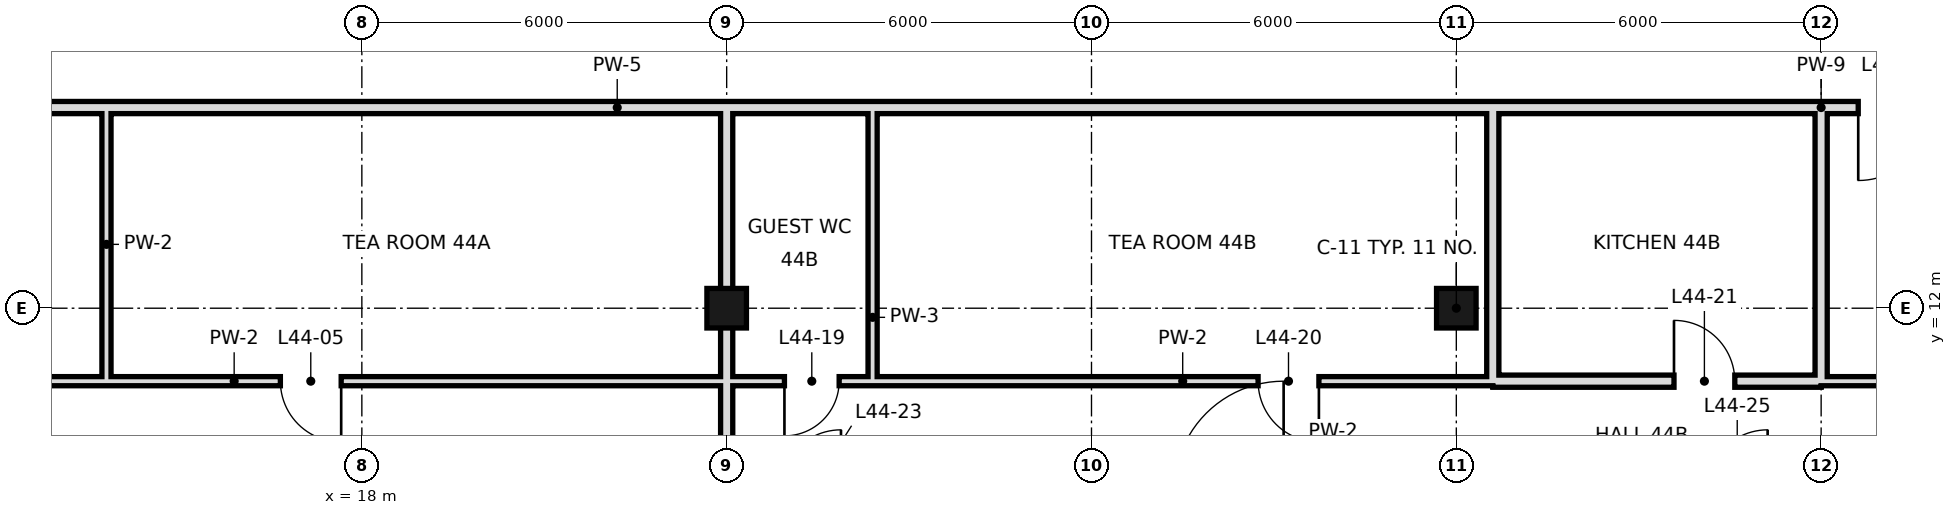
"""IFC4 building model, lengths in metres.
Left out: names, types, materials, properties, quantities, classifications, styles, units other than length and angle.
Written with IfcOpenShell. Run it as: python <this file> out.ifc"""

import sys

from ifc_helpers import new_model, si_unit, direction, frame, frame_2d, origin, origin_2d, place, context, subcontext, project, spatial, rectangle, hollow_rectangle, extrude, element, fill, save


model = new_model("IFC4")
c1 = context("Model", 3, precision=1e-05, world=origin(), true_north=direction((0.0, 1.0)))
c2 = subcontext(c1, "Body", "Model", "MODEL_VIEW")
j1 = project(units=[si_unit("LENGTHUNIT", "METRE"), si_unit("PLANEANGLEUNIT", "RADIAN")], contexts=[c1])
p1 = place(None, origin())
s1 = spatial("IfcSite", under=j1, at=p1, CompositionType="ELEMENT")
p2 = place(p1, origin())
s2 = spatial("IfcBuilding", under=s1, at=p2, CompositionType="ELEMENT")
p3 = place(p2, frame((0.0, 0.0, 192.0)))
s3 = spatial("IfcBuildingStorey", under=s2, at=p3, CompositionType="ELEMENT", Elevation=192.0)
for number, where, z_axis, x_axis in (
    (1, (24.0, 12.0, 0.0), (0.0, 0.0, 1.0), (1.0, 0.0, 0.0)),
    (2, (36.0, 12.0, 0.0), (0.0, 0.0, 1.0), (1.0, 0.0, 0.0)),
):
    element("IfcColumn", number, at=place(p3, frame(where, z_axis=z_axis, x_axis=x_axis)), inside=s3, PredefinedType="COLUMN", context=c2, shape_type="SweptSolid", body=[
        extrude(hollow_rectangle(XDim=0.65, YDim=0.65, WallThickness=0.032, at=origin_2d()), origin(), (0.0, 0.0, 1.0), 3.6),
    ])
p4 = place(p3, frame((13.8, 10.8, 0.0), z_axis=(0.0, 0.0, 1.0), x_axis=(0.0, 1.0, 0.0)))
e3 = element("IfcWall", 3, at=p4, inside=s3, PredefinedType="PARTITIONING", context=c2, shape_type="SweptSolid", body=[
    extrude(rectangle(XDim=4.5, YDim=0.15, at=frame_2d((2.25, 0.0))), origin(), (0.0, 0.0, 1.0), 3.42),
])
p5 = place(p3, frame((24.0, 0.0, 0.0), z_axis=(0.0, 0.0, 1.0), x_axis=(0.0, 1.0, 0.0)))
e4 = element("IfcWall", 4, at=p5, inside=s3, PredefinedType="SOLIDWALL", context=c2, shape_type="SweptSolid", body=[
    extrude(rectangle(XDim=15.3, YDim=0.2, at=frame_2d((7.65, 0.0))), origin(), (0.0, 0.0, 1.0), 2.72),
])
p6 = place(p3, frame((26.4, 10.8, 0.0), z_axis=(0.0, 0.0, 1.0), x_axis=(0.0, 1.0, 0.0)))
e5 = element("IfcWall", 5, at=p6, inside=s3, PredefinedType="PARTITIONING", context=c2, shape_type="SweptSolid", body=[
    extrude(rectangle(XDim=4.5, YDim=0.15, at=frame_2d((2.25, 0.0))), origin(), (0.0, 0.0, 1.0), 3.42),
])
for number, where, z_axis, x_axis in (
    (6, (36.6, 10.8, 0.0), (0.0, 0.0, 1.0), (0.0, 1.0, 0.0)),
    (7, (42.0, 10.8, 0.0), (0.0, 0.0, 1.0), (0.0, 1.0, 0.0)),
):
    element("IfcWall", number, at=place(p3, frame(where, z_axis=z_axis, x_axis=x_axis)), inside=s3, PredefinedType="SOLIDWALL", context=c2, shape_type="SweptSolid", body=[
        extrude(rectangle(XDim=4.5, YDim=0.2, at=frame_2d((2.25, 0.0))), origin(), (0.0, 0.0, 1.0), 2.72),
    ])
p7 = place(p3, frame((36.6, 10.8, 0.0), z_axis=(0.0, 0.0, 1.0), x_axis=(1.0, 0.0, 0.0)))
e8 = element("IfcWall", 8, at=p7, inside=s3, PredefinedType="SOLIDWALL", context=c2, shape_type="SweptSolid", body=[
    extrude(rectangle(XDim=5.4, YDim=0.2, at=frame_2d((2.7, 0.0))), origin(), (0.0, 0.0, 1.0), 2.72),
])
p8 = place(p7, frame((2.98, 0.0, 0.0)))
e9 = element("IfcOpeningElement", 9, at=p8, cuts=e8, PredefinedType="OPENING", context=c2, shape_type="SweptSolid", body=[
    extrude(rectangle(XDim=1.0, YDim=2.4, at=frame_2d((0.5, 1.2))), frame((0.0, 0.11, 0.0), z_axis=(0.0, -1.0, 0.0), x_axis=(1.0, 0.0, 0.0)), (0.0, 0.0, 1.0), 0.22),
])
p9 = place(p3, frame((7.8, 10.8, 0.0), z_axis=(0.0, 0.0, 1.0), x_axis=(1.0, 0.0, 0.0)))
e10 = element("IfcWall", 10, at=p9, inside=s3, PredefinedType="PARTITIONING", context=c2, shape_type="SweptSolid", body=[
    extrude(rectangle(XDim=16.2, YDim=0.15, at=frame_2d((8.1, 0.0))), origin(), (0.0, 0.0, 1.0), 3.42),
])
p10 = place(p9, frame((2.5, 0.0, 0.0)))
e11 = element("IfcOpeningElement", 11, at=p10, cuts=e10, PredefinedType="OPENING", context=c2, shape_type="SweptSolid", body=[
    extrude(rectangle(XDim=1.0, YDim=2.4, at=frame_2d((0.5, 1.2))), frame((0.0, 0.085, 0.0), z_axis=(0.0, -1.0, 0.0), x_axis=(1.0, 0.0, 0.0)), (0.0, 0.0, 1.0), 0.17),
])
p11 = place(p9, frame((8.86, 0.0, 0.0)))
e12 = element("IfcOpeningElement", 12, at=p11, cuts=e10, PredefinedType="OPENING", context=c2, shape_type="SweptSolid", body=[
    extrude(rectangle(XDim=1.0, YDim=2.4, at=frame_2d((0.5, 1.2))), frame((0.0, 0.085, 0.0), z_axis=(0.0, -1.0, 0.0), x_axis=(1.0, 0.0, 0.0)), (0.0, 0.0, 1.0), 0.17),
])
p12 = place(p3, frame((26.4, 10.8, 0.0), z_axis=(0.0, 0.0, 1.0), x_axis=(1.0, 0.0, 0.0)))
e13 = element("IfcWall", 13, at=p12, inside=s3, PredefinedType="PARTITIONING", context=c2, shape_type="SweptSolid", body=[
    extrude(rectangle(XDim=10.2, YDim=0.15, at=frame_2d((5.1, 0.0))), origin(), (0.0, 0.0, 1.0), 3.42),
])
p13 = place(p12, frame((6.34, 0.0, 0.0)))
e14 = element("IfcOpeningElement", 14, at=p13, cuts=e13, PredefinedType="OPENING", context=c2, shape_type="SweptSolid", body=[
    extrude(rectangle(XDim=1.0, YDim=2.4, at=frame_2d((0.5, 1.2))), frame((0.0, 0.085, 0.0), z_axis=(0.0, -1.0, 0.0), x_axis=(1.0, 0.0, 0.0)), (0.0, 0.0, 1.0), 0.17),
])
p14 = place(p3, frame((42.0, 10.8, 0.0), z_axis=(0.0, 0.0, 1.0), x_axis=(1.0, 0.0, 0.0)))
e15 = element("IfcWall", 15, at=p14, inside=s3, PredefinedType="PARTITIONING", context=c2, shape_type="SweptSolid", body=[
    extrude(rectangle(XDim=12.6, YDim=0.15, at=frame_2d((6.3, 0.0))), origin(), (0.0, 0.0, 1.0), 3.42),
])
p15 = place(p14, frame((1.24, 0.0, 0.0)))
e16 = element("IfcOpeningElement", 16, at=p15, cuts=e15, PredefinedType="OPENING", context=c2, shape_type="SweptSolid", body=[
    extrude(rectangle(XDim=1.0, YDim=2.4, at=frame_2d((0.5, 1.2))), frame((0.0, 0.085, 0.0), z_axis=(0.0, -1.0, 0.0), x_axis=(1.0, 0.0, 0.0)), (0.0, 0.0, 1.0), 0.17),
])
p16 = place(p14, frame((9.04, 0.0, 0.0)))
e17 = element("IfcOpeningElement", 17, at=p16, cuts=e15, PredefinedType="OPENING", context=c2, shape_type="SweptSolid", body=[
    extrude(rectangle(XDim=1.0, YDim=2.4, at=frame_2d((0.5, 1.2))), frame((0.0, 0.085, 0.0), z_axis=(0.0, -1.0, 0.0), x_axis=(1.0, 0.0, 0.0)), (0.0, 0.0, 1.0), 0.17),
])
p17 = place(p3, frame((24.0, 10.8, 0.0), z_axis=(0.0, 0.0, 1.0), x_axis=(1.0, 0.0, 0.0)))
e18 = element("IfcWall", 18, at=p17, inside=s3, PredefinedType="PARTITIONING", context=c2, shape_type="SweptSolid", body=[
    extrude(rectangle(XDim=2.4, YDim=0.15, at=frame_2d((1.2, 0.0))), origin(), (0.0, 0.0, 1.0), 3.42),
])
p18 = place(p17, frame((0.95, 0.0, 0.0)))
e19 = element("IfcOpeningElement", 19, at=p18, cuts=e18, PredefinedType="OPENING", context=c2, shape_type="SweptSolid", body=[
    extrude(rectangle(XDim=0.9, YDim=2.4, at=frame_2d((0.45, 1.2))), frame((0.0, 0.085, 0.0), z_axis=(0.0, -1.0, 0.0), x_axis=(1.0, 0.0, 0.0)), (0.0, 0.0, 1.0), 0.17),
])
p19 = place(p3, frame((7.8, 15.3, 0.0), z_axis=(0.0, 0.0, 1.0), x_axis=(1.0, 0.0, 0.0)))
e20 = element("IfcWall", 20, at=p19, inside=s3, PredefinedType="SOLIDWALL", context=c2, shape_type="SweptSolid", body=[
    extrude(rectangle(XDim=28.8, YDim=0.2, at=frame_2d((14.4, 0.0))), origin(), (0.0, 0.0, 1.0), 2.72),
])
p20 = place(p19, frame((1.54, 0.0, 0.0)))
e21 = element("IfcOpeningElement", 21, at=p20, cuts=e20, PredefinedType="OPENING", context=c2, shape_type="SweptSolid", body=[
    extrude(rectangle(XDim=1.2, YDim=2.4, at=frame_2d((0.6, 1.2))), frame((0.0, 0.11, 0.0), z_axis=(0.0, -1.0, 0.0), x_axis=(1.0, 0.0, 0.0)), (0.0, 0.0, 1.0), 0.22),
])
p21 = place(p3, frame((42.0, 15.3, 0.0), z_axis=(0.0, 0.0, 1.0), x_axis=(1.0, 0.0, 0.0)))
e22 = element("IfcWall", 22, at=p21, inside=s3, PredefinedType="SOLIDWALL", context=c2, shape_type="SweptSolid", body=[
    extrude(rectangle(XDim=2.9, YDim=0.2, at=frame_2d((1.45, 0.0))), origin(), (0.0, 0.0, 1.0), 2.72),
])
p22 = place(p21, frame((0.61, 0.0, 0.0)))
e23 = element("IfcOpeningElement", 23, at=p22, cuts=e22, PredefinedType="OPENING", context=c2, shape_type="SweptSolid", body=[
    extrude(rectangle(XDim=1.2, YDim=2.4, at=frame_2d((0.6, 1.2))), frame((0.0, 0.11, 0.0), z_axis=(0.0, -1.0, 0.0), x_axis=(1.0, 0.0, 0.0)), (0.0, 0.0, 1.0), 0.22),
])
p23 = place(p3, frame((36.6, 15.3, 0.0), z_axis=(0.0, 0.0, 1.0), x_axis=(1.0, 0.0, 0.0)))
e24 = element("IfcWall", 24, at=p23, inside=s3, PredefinedType="SOLIDWALL", context=c2, shape_type="SweptSolid", body=[
    extrude(rectangle(XDim=5.4, YDim=0.2, at=frame_2d((2.7, 0.0))), origin(), (0.0, 0.0, 1.0), 2.72),
])
p24 = place(p11, origin())
e25 = element("IfcDoor", 25, at=p24, inside=s3, OperationType="SINGLE_SWING_RIGHT", PredefinedType="DOOR", context=c2, shape_type="SweptSolid", body=[
    extrude(rectangle(XDim=1.0, YDim=2.4, at=frame_2d((0.5, 1.2))), frame((0.0, 0.025, 0.0), z_axis=(0.0, -1.0, 0.0), x_axis=(1.0, 0.0, 0.0)), (0.0, 0.0, 1.0), 0.05),
])
fill(e12, e25)
p25 = place(p18, frame((0.9, 0.0, 0.0), z_axis=(0.0, 0.0, 1.0), x_axis=(-1.0, 0.0, 0.0)))
e26 = element("IfcDoor", 26, at=p25, inside=s3, OperationType="SINGLE_SWING_RIGHT", PredefinedType="DOOR", context=c2, shape_type="SweptSolid", body=[
    extrude(rectangle(XDim=0.9, YDim=2.4, at=frame_2d((0.45, 1.2))), frame((0.0, 0.025, 0.0), z_axis=(0.0, -1.0, 0.0), x_axis=(1.0, 0.0, 0.0)), (0.0, 0.0, 1.0), 0.05),
])
fill(e19, e26)
p26 = place(p13, origin())
e27 = element("IfcDoor", 27, at=p26, inside=s3, OperationType="SINGLE_SWING_RIGHT", PredefinedType="DOOR", context=c2, shape_type="SweptSolid", body=[
    extrude(rectangle(XDim=1.0, YDim=2.4, at=frame_2d((0.5, 1.2))), frame((0.0, 0.025, 0.0), z_axis=(0.0, -1.0, 0.0), x_axis=(1.0, 0.0, 0.0)), (0.0, 0.0, 1.0), 0.05),
])
fill(e14, e27)
p27 = place(p8, origin())
e28 = element("IfcDoor", 28, at=p27, inside=s3, OperationType="SINGLE_SWING_LEFT", PredefinedType="DOOR", context=c2, shape_type="SweptSolid", body=[
    extrude(rectangle(XDim=1.0, YDim=2.4, at=frame_2d((0.5, 1.2))), frame((0.0, 0.025, 0.0), z_axis=(0.0, -1.0, 0.0), x_axis=(1.0, 0.0, 0.0)), (0.0, 0.0, 1.0), 0.05),
])
fill(e9, e28)
p28 = place(p22, frame((1.2, 0.0, 0.0), z_axis=(0.0, 0.0, 1.0), x_axis=(-1.0, 0.0, 0.0)))
e29 = element("IfcDoor", 29, at=p28, inside=s3, OperationType="SINGLE_SWING_RIGHT", PredefinedType="DOOR", context=c2, shape_type="SweptSolid", body=[
    extrude(rectangle(XDim=1.2, YDim=2.4, at=frame_2d((0.6, 1.2))), frame((0.0, 0.025, 0.0), z_axis=(0.0, -1.0, 0.0), x_axis=(1.0, 0.0, 0.0)), (0.0, 0.0, 1.0), 0.05),
])
fill(e23, e29)
save(model, sys.argv[1])
